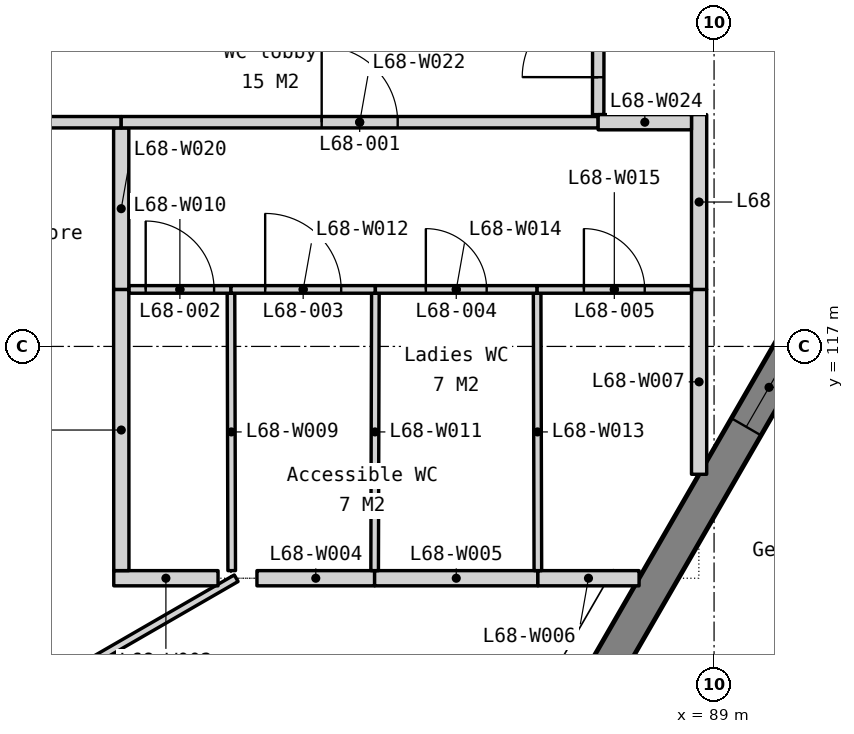
"""IFC4 building model, lengths in metres.
Left out: names, types, materials, properties, quantities, classifications, styles, units other than length and angle.
Written with IfcOpenShell. Run it as: python <this file> out.ifc"""

import sys

from ifc_helpers import new_model, si_unit, direction, frame, frame_2d, origin, place, context, subcontext, project, spatial, polyline, rectangle, outline, extrude, element, fill, save


model = new_model("IFC4")
c1 = context("Model", 3, precision=1e-05, world=origin(), true_north=direction((0.0, 1.0)))
c2 = subcontext(c1, "Body", "Model", "MODEL_VIEW")
j1 = project(units=[si_unit("LENGTHUNIT", "METRE"), si_unit("PLANEANGLEUNIT", "RADIAN")], contexts=[c1])
p1 = place(None, origin())
s1 = spatial("IfcSite", under=j1, at=p1, CompositionType="ELEMENT")
p2 = place(p1, origin())
s2 = spatial("IfcBuilding", under=s1, at=p2, CompositionType="ELEMENT")
p3 = place(p2, frame((0.0, 0.0, 277.7)))
s3 = spatial("IfcBuildingStorey", under=s2, at=p3, CompositionType="ELEMENT", Elevation=277.7)
p4 = place(p3, frame((86.427, 110.752, -0.15), z_axis=(0.0, 0.0, 1.0), x_axis=(0.500000383388, 0.866025182435, 0.0)))
e1 = element("IfcWall", 1, at=p4, inside=s3, PredefinedType="SOLIDWALL", context=c2, shape_type="SweptSolid", body=[
    extrude(outline(polyline([(25.929, 3.9), (25.929, 0.0), (0.0, 0.0), (0.0, 3.9), (25.929, 3.9)])), frame((0.0, 0.225, 0.0), z_axis=(0.0, -1.0, 0.0), x_axis=(1.0, 0.0, 0.0)), (0.0, 0.0, 1.0), 0.45),
])
p5 = place(p4, frame((5.993, 0.0, 0.95)))
e2 = element("IfcOpeningElement", 2, at=p5, cuts=e1, PredefinedType="OPENING", context=c2, shape_type="SweptSolid", body=[
    extrude(rectangle(XDim=1.2, YDim=2.2, at=frame_2d((0.6, 1.1))), frame((0.0, 0.235, 0.0), z_axis=(0.0, -1.0, 0.0), x_axis=(1.0, 0.0, 0.0)), (0.0, 0.0, 1.0), 0.47),
])
p6 = place(p4, frame((7.693, 0.0, 0.95)))
e3 = element("IfcOpeningElement", 3, at=p6, cuts=e1, PredefinedType="OPENING", context=c2, shape_type="SweptSolid", body=[
    extrude(rectangle(XDim=1.2, YDim=2.2, at=frame_2d((0.6, 1.1))), frame((0.0, 0.235, 0.0), z_axis=(0.0, -1.0, 0.0), x_axis=(1.0, 0.0, 0.0)), (0.0, 0.0, 1.0), 0.47),
])
p7 = place(p4, frame((15.236, 0.0, 0.95)))
e4 = element("IfcOpeningElement", 4, at=p7, cuts=e1, PredefinedType="OPENING", context=c2, shape_type="SweptSolid", body=[
    extrude(rectangle(XDim=1.2, YDim=2.2, at=frame_2d((0.6, 1.1))), frame((0.0, 0.235, 0.0), z_axis=(0.0, -1.0, 0.0), x_axis=(1.0, 0.0, 0.0)), (0.0, 0.0, 1.0), 0.47),
])
p8 = place(p4, frame((16.936, 0.0, 0.95)))
e5 = element("IfcOpeningElement", 5, at=p8, cuts=e1, PredefinedType="OPENING", context=c2, shape_type="SweptSolid", body=[
    extrude(rectangle(XDim=1.2, YDim=2.2, at=frame_2d((0.6, 1.1))), frame((0.0, 0.235, 0.0), z_axis=(0.0, -1.0, 0.0), x_axis=(1.0, 0.0, 0.0)), (0.0, 0.0, 1.0), 0.47),
])
p9 = place(p4, frame((23.985, 0.0, 0.95)))
e6 = element("IfcOpeningElement", 6, at=p9, cuts=e1, PredefinedType="OPENING", context=c2, shape_type="SweptSolid", body=[
    extrude(rectangle(XDim=1.2, YDim=2.2, at=frame_2d((0.6, 1.1))), frame((0.0, 0.235, 0.0), z_axis=(0.0, -1.0, 0.0), x_axis=(1.0, 0.0, 0.0)), (0.0, 0.0, 1.0), 0.47),
])
p10 = place(p3, frame((74.668, 109.305, 0.0), z_axis=(0.0, 0.0, 1.0), x_axis=(0.866021891294, 0.500006083763, 0.0)))
e7 = element("IfcWall", 7, at=p10, inside=s3, PredefinedType="PARTITIONING", context=c2, shape_type="SweptSolid", body=[
    extrude(rectangle(XDim=9.289, YDim=0.1, at=frame_2d((4.645, 0.0))), origin(), (0.0, 0.0, 1.0), 3.75),
])
p11 = place(p10, frame((4.195, 0.0, 0.0)))
e8 = element("IfcOpeningElement", 8, at=p11, cuts=e7, PredefinedType="OPENING", context=c2, shape_type="SweptSolid", body=[
    extrude(rectangle(XDim=0.9, YDim=2.1, at=frame_2d((0.45, 1.05))), frame((0.0, 0.06, 0.0), z_axis=(0.0, -1.0, 0.0), x_axis=(1.0, 0.0, 0.0)), (0.0, 0.0, 1.0), 0.12),
])
p12 = place(p3, frame((81.102, 113.95, 0.0), z_axis=(0.0, 0.0, 1.0), x_axis=(1.0, 0.0, 0.0)))
e9 = element("IfcWall", 9, at=p12, inside=s3, PredefinedType="PARTITIONING", context=c2, shape_type="SweptSolid", body=[
    extrude(rectangle(XDim=1.372, YDim=0.2, at=frame_2d((0.686, 0.0))), origin(), (0.0, 0.0, 1.0), 3.75),
])
p13 = place(p3, frame((82.986, 113.95, 0.0), z_axis=(0.0, 0.0, 1.0), x_axis=(1.0, 0.0, 0.0)))
e10 = element("IfcWall", 10, at=p13, inside=s3, PredefinedType="PARTITIONING", context=c2, shape_type="SweptSolid", body=[
    extrude(rectangle(XDim=1.548, YDim=0.2, at=frame_2d((0.774, 0.0))), origin(), (0.0, 0.0, 1.0), 3.75),
])
p14 = place(p3, frame((84.534, 113.95, 0.0), z_axis=(0.0, 0.0, 1.0), x_axis=(1.0, 0.0, 0.0)))
e11 = element("IfcWall", 11, at=p14, inside=s3, PredefinedType="PARTITIONING", context=c2, shape_type="SweptSolid", body=[
    extrude(rectangle(XDim=2.148, YDim=0.2, at=frame_2d((1.074, 0.0))), origin(), (0.0, 0.0, 1.0), 3.75),
])
p15 = place(p3, frame((86.682, 113.95, 0.0), z_axis=(0.0, 0.0, 1.0), x_axis=(1.0, 0.0, 0.0)))
e12 = element("IfcWall", 12, at=p15, inside=s3, PredefinedType="PARTITIONING", context=c2, shape_type="SweptSolid", body=[
    extrude(rectangle(XDim=1.332, YDim=0.2, at=frame_2d((0.666, 0.0))), origin(), (0.0, 0.0, 1.0), 3.75),
])
p16 = place(p3, frame((88.803, 115.318, 0.0), z_axis=(0.0, 0.0, 1.0), x_axis=(0.0, 1.0, 0.0)))
e13 = element("IfcWall", 13, at=p16, inside=s3, PredefinedType="PARTITIONING", context=c2, shape_type="SweptSolid", body=[
    extrude(rectangle(XDim=2.432, YDim=0.2, at=frame_2d((1.216, 0.0))), origin(), (0.0, 0.0, 1.0), 3.062),
])
p17 = place(p3, frame((82.654, 114.05, 0.0), z_axis=(0.0, 0.0, 1.0), x_axis=(-0.002675575707, 0.999996420641, 0.0)))
e14 = element("IfcWall", 14, at=p17, inside=s3, PredefinedType="PARTITIONING", context=c2, shape_type="SweptSolid", body=[
    extrude(rectangle(XDim=3.65, YDim=0.1, at=frame_2d((1.825, 0.0))), origin(), (0.0, 0.0, 1.0), 3.75),
])
p18 = place(p3, frame((81.3, 117.75, 0.0), z_axis=(0.0, 0.0, 1.0), x_axis=(1.0, 0.0, 0.0)))
e15 = element("IfcWall", 15, at=p18, inside=s3, PredefinedType="PARTITIONING", context=c2, shape_type="SweptSolid", body=[
    extrude(rectangle(XDim=1.344, YDim=0.1, at=frame_2d((0.672, 0.0))), origin(), (0.0, 0.0, 1.0), 3.75),
])
p19 = place(p18, frame((0.222, 0.0, 0.0)))
e16 = element("IfcOpeningElement", 16, at=p19, cuts=e15, PredefinedType="OPENING", context=c2, shape_type="SweptSolid", body=[
    extrude(rectangle(XDim=0.9, YDim=2.1, at=frame_2d((0.45, 1.05))), frame((0.0, 0.06, 0.0), z_axis=(0.0, -1.0, 0.0), x_axis=(1.0, 0.0, 0.0)), (0.0, 0.0, 1.0), 0.12),
])
p20 = place(p3, frame((84.534, 114.05, 0.0), z_axis=(0.0, 0.0, 1.0), x_axis=(0.002675575707, 0.999996420641, 0.0)))
e17 = element("IfcWall", 17, at=p20, inside=s3, PredefinedType="PARTITIONING", context=c2, shape_type="SweptSolid", body=[
    extrude(rectangle(XDim=3.65, YDim=0.1, at=frame_2d((1.825, 0.0))), origin(), (0.0, 0.0, 1.0), 3.75),
])
p21 = place(p3, frame((82.644, 117.75, 0.0), z_axis=(0.0, 0.0, 1.0), x_axis=(1.0, 0.0, 0.0)))
e18 = element("IfcWall", 18, at=p21, inside=s3, PredefinedType="PARTITIONING", context=c2, shape_type="SweptSolid", body=[
    extrude(rectangle(XDim=1.9, YDim=0.1, at=frame_2d((0.95, 0.0))), origin(), (0.0, 0.0, 1.0), 3.75),
])
p22 = place(p21, frame((0.45, 0.0, 0.0)))
e19 = element("IfcOpeningElement", 19, at=p22, cuts=e18, PredefinedType="OPENING", context=c2, shape_type="SweptSolid", body=[
    extrude(rectangle(XDim=1.0, YDim=2.1, at=frame_2d((0.5, 1.05))), frame((0.0, 0.06, 0.0), z_axis=(0.0, -1.0, 0.0), x_axis=(1.0, 0.0, 0.0)), (0.0, 0.0, 1.0), 0.12),
])
p23 = place(p3, frame((86.682, 114.05, 0.0), z_axis=(0.0, 0.0, 1.0), x_axis=(-0.002608686776, 0.999996597371, 0.0)))
e20 = element("IfcWall", 20, at=p23, inside=s3, PredefinedType="PARTITIONING", context=c2, shape_type="SweptSolid", body=[
    extrude(rectangle(XDim=3.65, YDim=0.1, at=frame_2d((1.825, 0.0))), origin(), (0.0, 0.0, 1.0), 3.75),
])
p24 = place(p3, frame((84.544, 117.75, 0.0), z_axis=(0.0, 0.0, 1.0), x_axis=(1.0, 0.0, 0.0)))
e21 = element("IfcWall", 21, at=p24, inside=s3, PredefinedType="PARTITIONING", context=c2, shape_type="SweptSolid", body=[
    extrude(rectangle(XDim=2.128, YDim=0.1, at=frame_2d((1.064, 0.0))), origin(), (0.0, 0.0, 1.0), 3.75),
])
p25 = place(p24, frame((0.664, 0.0, 0.0)))
e22 = element("IfcOpeningElement", 22, at=p25, cuts=e21, PredefinedType="OPENING", context=c2, shape_type="SweptSolid", body=[
    extrude(rectangle(XDim=0.8, YDim=2.1, at=frame_2d((0.4, 1.05))), frame((0.0, 0.06, 0.0), z_axis=(0.0, -1.0, 0.0), x_axis=(1.0, 0.0, 0.0)), (0.0, 0.0, 1.0), 0.12),
])
p26 = place(p3, frame((86.672, 117.75, 0.0), z_axis=(0.0, 0.0, 1.0), x_axis=(1.0, 0.0, 0.0)))
e23 = element("IfcWall", 23, at=p26, inside=s3, PredefinedType="PARTITIONING", context=c2, shape_type="SweptSolid", body=[
    extrude(rectangle(XDim=2.031, YDim=0.1, at=frame_2d((1.015, 0.0))), origin(), (0.0, 0.0, 1.0), 3.75),
])
p27 = place(p26, frame((0.615, 0.0, 0.0)))
e24 = element("IfcOpeningElement", 24, at=p27, cuts=e23, PredefinedType="OPENING", context=c2, shape_type="SweptSolid", body=[
    extrude(rectangle(XDim=0.8, YDim=2.1, at=frame_2d((0.4, 1.05))), frame((0.0, 0.06, 0.0), z_axis=(0.0, -1.0, 0.0), x_axis=(1.0, 0.0, 0.0)), (0.0, 0.0, 1.0), 0.12),
])
p28 = place(p3, frame((88.803, 120.05, 0.0), z_axis=(0.0, 0.0, 1.0), x_axis=(0.0, -1.0, 0.0)))
e25 = element("IfcWall", 25, at=p28, inside=s3, PredefinedType="PARTITIONING", context=c2, shape_type="SweptSolid", body=[
    extrude(rectangle(XDim=2.3, YDim=0.2, at=frame_2d((1.15, 0.0))), origin(), (0.0, 0.0, 1.0), 3.062),
])
p29 = place(p3, frame((81.2, 117.75, 0.0), z_axis=(0.0, 0.0, 1.0), x_axis=(0.000527878514, -0.999999860672, 0.0)))
e26 = element("IfcWall", 26, at=p29, inside=s3, PredefinedType="PARTITIONING", context=c2, shape_type="SweptSolid", body=[
    extrude(rectangle(XDim=3.7, YDim=0.2, at=frame_2d((1.85, 0.0))), origin(), (0.0, 0.0, 1.0), 3.75),
])
p30 = place(p3, frame((81.2, 117.75, 0.0), z_axis=(0.0, 0.0, 1.0), x_axis=(0.0, 1.0, 0.0)))
e27 = element("IfcWall", 27, at=p30, inside=s3, PredefinedType="PARTITIONING", context=c2, shape_type="SweptSolid", body=[
    extrude(rectangle(XDim=2.125, YDim=0.2, at=frame_2d((1.062, 0.0))), origin(), (0.0, 0.0, 1.0), 3.75),
])
p31 = place(p3, frame((74.619, 119.95, 0.0), z_axis=(0.0, 0.0, 1.0), x_axis=(1.0, 0.0, 0.0)))
e28 = element("IfcWall", 28, at=p31, inside=s3, PredefinedType="PARTITIONING", context=c2, shape_type="SweptSolid", body=[
    extrude(rectangle(XDim=6.581, YDim=0.15, at=frame_2d((3.291, 0.0))), origin(), (0.0, 0.0, 1.0), 3.75),
])
p32 = place(p31, frame((2.791, 0.0, 0.0)))
e29 = element("IfcOpeningElement", 29, at=p32, cuts=e28, PredefinedType="OPENING", context=c2, shape_type="SweptSolid", body=[
    extrude(rectangle(XDim=1.0, YDim=2.1, at=frame_2d((0.5, 1.05))), frame((0.0, 0.085, 0.0), z_axis=(0.0, -1.0, 0.0), x_axis=(1.0, 0.0, 0.0)), (0.0, 0.0, 1.0), 0.17),
])
p33 = place(p3, frame((81.2, 119.95, 0.0), z_axis=(0.0, 0.0, 1.0), x_axis=(1.0, 0.0, 0.0)))
e30 = element("IfcWall", 30, at=p33, inside=s3, PredefinedType="PARTITIONING", context=c2, shape_type="SweptSolid", body=[
    extrude(rectangle(XDim=6.275, YDim=0.15, at=frame_2d((3.137, 0.0))), origin(), (0.0, 0.0, 1.0), 3.75),
])
p34 = place(p33, frame((2.637, 0.0, 0.0)))
e31 = element("IfcOpeningElement", 31, at=p34, cuts=e30, PredefinedType="OPENING", context=c2, shape_type="SweptSolid", body=[
    extrude(rectangle(XDim=1.0, YDim=2.1, at=frame_2d((0.5, 1.05))), frame((0.0, 0.085, 0.0), z_axis=(0.0, -1.0, 0.0), x_axis=(1.0, 0.0, 0.0)), (0.0, 0.0, 1.0), 0.17),
])
p35 = place(p3, frame((87.475, 120.05, 0.0), z_axis=(0.0, 0.0, 1.0), x_axis=(0.001476558006, 0.999998909888, 0.0)))
e32 = element("IfcWall", 32, at=p35, inside=s3, PredefinedType="PARTITIONING", context=c2, shape_type="SweptSolid", body=[
    extrude(rectangle(XDim=1.984, YDim=0.15, at=frame_2d((0.992, 0.0))), origin(), (0.0, 0.0, 1.0), 3.75),
])
p36 = place(p35, frame((0.492, 0.0, 0.0)))
e33 = element("IfcOpeningElement", 33, at=p36, cuts=e32, PredefinedType="OPENING", context=c2, shape_type="SweptSolid", body=[
    extrude(rectangle(XDim=1.0, YDim=2.1, at=frame_2d((0.5, 1.05))), frame((0.0, 0.085, 0.0), z_axis=(0.0, -1.0, 0.0), x_axis=(1.0, 0.0, 0.0)), (0.0, 0.0, 1.0), 0.17),
])
p37 = place(p3, frame((87.475, 119.95, 0.0), z_axis=(0.0, 0.0, 1.0), x_axis=(1.0, 0.0, 0.0)))
e34 = element("IfcWall", 34, at=p37, inside=s3, PredefinedType="PARTITIONING", context=c2, shape_type="SweptSolid", body=[
    extrude(rectangle(XDim=1.228, YDim=0.2, at=frame_2d((0.614, 0.0))), origin(), (0.0, 0.0, 1.0), 3.75),
])
p38 = place(p5, origin())
e35 = element("IfcWindow", 35, at=p38, inside=s3, PartitioningType="SINGLE_PANEL", PredefinedType="WINDOW", context=c2, shape_type="SweptSolid", body=[
    extrude(rectangle(XDim=1.2, YDim=2.2, at=frame_2d((0.6, 1.1))), frame((0.0, 0.03, 0.0), z_axis=(0.0, -1.0, 0.0), x_axis=(1.0, 0.0, 0.0)), (0.0, 0.0, 1.0), 0.06),
])
fill(e2, e35)
p39 = place(p34, origin())
e36 = element("IfcDoor", 36, at=p39, inside=s3, OperationType="SINGLE_SWING_LEFT", PredefinedType="DOOR", context=c2, shape_type="SweptSolid", body=[
    extrude(rectangle(XDim=1.0, YDim=2.1, at=frame_2d((0.5, 1.05))), frame((0.0, 0.025, 0.0), z_axis=(0.0, -1.0, 0.0), x_axis=(1.0, 0.0, 0.0)), (0.0, 0.0, 1.0), 0.05),
])
fill(e31, e36)
p40 = place(p19, origin())
e37 = element("IfcDoor", 37, at=p40, inside=s3, OperationType="SINGLE_SWING_LEFT", PredefinedType="DOOR", context=c2, shape_type="SweptSolid", body=[
    extrude(rectangle(XDim=0.9, YDim=2.1, at=frame_2d((0.45, 1.05))), frame((0.0, 0.025, 0.0), z_axis=(0.0, -1.0, 0.0), x_axis=(1.0, 0.0, 0.0)), (0.0, 0.0, 1.0), 0.05),
])
fill(e16, e37)
p41 = place(p22, origin())
e38 = element("IfcDoor", 38, at=p41, inside=s3, OperationType="SINGLE_SWING_LEFT", PredefinedType="DOOR", context=c2, shape_type="SweptSolid", body=[
    extrude(rectangle(XDim=1.0, YDim=2.1, at=frame_2d((0.5, 1.05))), frame((0.0, 0.025, 0.0), z_axis=(0.0, -1.0, 0.0), x_axis=(1.0, 0.0, 0.0)), (0.0, 0.0, 1.0), 0.05),
])
fill(e19, e38)
p42 = place(p25, origin())
e39 = element("IfcDoor", 39, at=p42, inside=s3, OperationType="SINGLE_SWING_LEFT", PredefinedType="DOOR", context=c2, shape_type="SweptSolid", body=[
    extrude(rectangle(XDim=0.8, YDim=2.1, at=frame_2d((0.4, 1.05))), frame((0.0, 0.025, 0.0), z_axis=(0.0, -1.0, 0.0), x_axis=(1.0, 0.0, 0.0)), (0.0, 0.0, 1.0), 0.05),
])
fill(e22, e39)
p43 = place(p27, origin())
e40 = element("IfcDoor", 40, at=p43, inside=s3, OperationType="SINGLE_SWING_LEFT", PredefinedType="DOOR", context=c2, shape_type="SweptSolid", body=[
    extrude(rectangle(XDim=0.8, YDim=2.1, at=frame_2d((0.4, 1.05))), frame((0.0, 0.025, 0.0), z_axis=(0.0, -1.0, 0.0), x_axis=(1.0, 0.0, 0.0)), (0.0, 0.0, 1.0), 0.05),
])
fill(e24, e40)
p44 = place(p36, origin())
e41 = element("IfcDoor", 41, at=p44, inside=s3, OperationType="SINGLE_SWING_LEFT", PredefinedType="DOOR", context=c2, shape_type="SweptSolid", body=[
    extrude(rectangle(XDim=1.0, YDim=2.1, at=frame_2d((0.5, 1.05))), frame((0.0, 0.025, 0.0), z_axis=(0.0, -1.0, 0.0), x_axis=(1.0, 0.0, 0.0)), (0.0, 0.0, 1.0), 0.05),
])
fill(e33, e41)
save(model, sys.argv[1])
